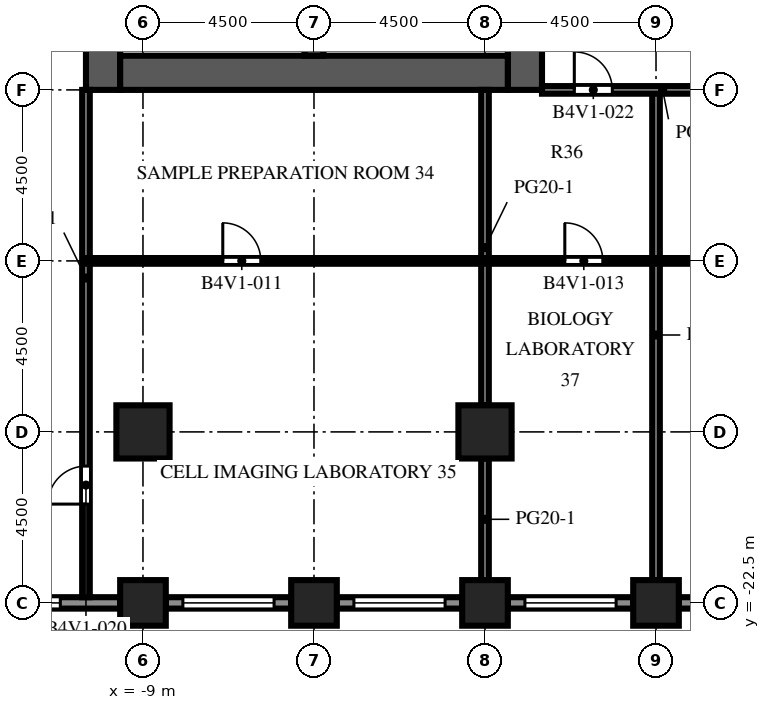
"""IFC4 building model, lengths in metres.
Left out: names, types, materials, properties, quantities, classifications, styles, units other than length and angle.
Written with IfcOpenShell. Run it as: python <this file> out.ifc"""

import sys

from ifc_helpers import new_model, si_unit, direction, frame, frame_2d, origin, origin_2d, place, context, subcontext, project, spatial, rectangle, extrude, element, fill, save


model = new_model("IFC4")
c1 = context("Model", 3, precision=1e-05, world=origin(), true_north=direction((0.0, 1.0)))
c2 = subcontext(c1, "Body", "Model", "MODEL_VIEW")
j1 = project(units=[si_unit("LENGTHUNIT", "METRE"), si_unit("PLANEANGLEUNIT", "RADIAN")], contexts=[c1])
p1 = place(None, origin())
s1 = spatial("IfcSite", under=j1, at=p1, CompositionType="ELEMENT")
p2 = place(p1, origin())
s2 = spatial("IfcBuilding", under=s1, at=p2, CompositionType="ELEMENT")
p3 = place(p2, frame((0.0, 0.0, 124.9)))
s3 = spatial("IfcBuildingStorey", under=s2, at=p3, CompositionType="ELEMENT", Elevation=124.9)
for number, where, z_axis, x_axis in (
    (1, (-9.0, -22.5, 0.0), (0.0, 0.0, 1.0), (1.0, 0.0, 0.0)),
    (2, (-4.5, -22.5, 0.0), (0.0, 0.0, 1.0), (1.0, 0.0, 0.0)),
    (3, (0.0, -22.5, 0.0), (0.0, 0.0, 1.0), (1.0, 0.0, 0.0)),
    (4, (4.5, -22.5, 0.0), (0.0, 0.0, 1.0), (1.0, 0.0, 0.0)),
):
    element("IfcColumn", number, at=place(p3, frame(where, z_axis=z_axis, x_axis=x_axis)), inside=s3, PredefinedType="COLUMN", context=c2, shape_type="SweptSolid", body=[
        extrude(rectangle(XDim=1.2, YDim=1.2, at=origin_2d()), origin(), (0.0, 0.0, 1.0), 4.1),
    ])
for number, where, z_axis, x_axis in (
    (5, (-9.0, -18.0, 0.0), (0.0, 0.0, 1.0), (1.0, 0.0, 0.0)),
    (6, (0.0, -18.0, 0.0), (0.0, 0.0, 1.0), (1.0, 0.0, 0.0)),
):
    element("IfcColumn", number, at=place(p3, frame(where, z_axis=z_axis, x_axis=x_axis)), inside=s3, PredefinedType="COLUMN", context=c2, shape_type="SweptSolid", body=[
        extrude(rectangle(XDim=1.4, YDim=1.4, at=origin_2d()), origin(), (0.0, 0.0, 1.0), 4.1),
    ])
p4 = place(p3, frame((-10.05, -9.0, 0.0), z_axis=(0.0, 0.0, 1.0), x_axis=(0.0, 1.0, 0.0)))
e7 = element("IfcWall", 7, at=p4, inside=s3, PredefinedType="SHEAR", context=c2, shape_type="SweptSolid", body=[
    extrude(rectangle(XDim=27.5, YDim=0.9, at=frame_2d((13.75, 0.0))), origin(), (0.0, 0.0, 1.0), 4.1),
])
p5 = place(p4, frame((12.55, 0.0, 0.0)))
e8 = element("IfcOpeningElement", 8, at=p5, cuts=e7, PredefinedType="OPENING", context=c2, shape_type="SweptSolid", body=[
    extrude(rectangle(XDim=2.4, YDim=2.4, at=frame_2d((1.2, 1.2))), frame((0.0, 0.46, 0.0), z_axis=(0.0, -1.0, 0.0), x_axis=(1.0, 0.0, 0.0)), (0.0, 0.0, 1.0), 0.92),
])
p6 = place(p4, frame((6.825, 0.0, 0.0)))
e9 = element("IfcOpeningElement", 9, at=p6, cuts=e7, PredefinedType="OPENING", context=c2, shape_type="SweptSolid", body=[
    extrude(rectangle(XDim=1.2, YDim=2.1, at=frame_2d((0.6, 1.05))), frame((0.0, 0.46, 0.0), z_axis=(0.0, -1.0, 0.0), x_axis=(1.0, 0.0, 0.0)), (0.0, 0.0, 1.0), 0.92),
])
p7 = place(p4, frame((19.475, 0.0, 0.0)))
e10 = element("IfcOpeningElement", 10, at=p7, cuts=e7, PredefinedType="OPENING", context=c2, shape_type="SweptSolid", body=[
    extrude(rectangle(XDim=1.2, YDim=2.1, at=frame_2d((0.6, 1.05))), frame((0.0, 0.46, 0.0), z_axis=(0.0, -1.0, 0.0), x_axis=(1.0, 0.0, 0.0)), (0.0, 0.0, 1.0), 0.92),
])
p8 = place(p3, frame((1.05, -9.0, 0.0), z_axis=(0.0, 0.0, 1.0), x_axis=(0.0, 1.0, 0.0)))
e11 = element("IfcWall", 11, at=p8, inside=s3, PredefinedType="SHEAR", context=c2, shape_type="SweptSolid", body=[
    extrude(rectangle(XDim=27.5, YDim=0.9, at=frame_2d((13.75, 0.0))), origin(), (0.0, 0.0, 1.0), 4.1),
])
p9 = place(p8, frame((12.55, 0.0, 0.0)))
e12 = element("IfcOpeningElement", 12, at=p9, cuts=e11, PredefinedType="OPENING", context=c2, shape_type="SweptSolid", body=[
    extrude(rectangle(XDim=2.4, YDim=2.4, at=frame_2d((1.2, 1.2))), frame((0.0, 0.46, 0.0), z_axis=(0.0, -1.0, 0.0), x_axis=(1.0, 0.0, 0.0)), (0.0, 0.0, 1.0), 0.92),
])
p10 = place(p8, frame((3.975, 0.0, 0.0)))
e13 = element("IfcOpeningElement", 13, at=p10, cuts=e11, PredefinedType="OPENING", context=c2, shape_type="SweptSolid", body=[
    extrude(rectangle(XDim=1.2, YDim=2.1, at=frame_2d((0.6, 1.05))), frame((0.0, 0.46, 0.0), z_axis=(0.0, -1.0, 0.0), x_axis=(1.0, 0.0, 0.0)), (0.0, 0.0, 1.0), 0.92),
])
p11 = place(p8, frame((22.325, 0.0, 0.0)))
e14 = element("IfcOpeningElement", 14, at=p11, cuts=e11, PredefinedType="OPENING", context=c2, shape_type="SweptSolid", body=[
    extrude(rectangle(XDim=1.2, YDim=2.1, at=frame_2d((0.6, 1.05))), frame((0.0, 0.46, 0.0), z_axis=(0.0, -1.0, 0.0), x_axis=(1.0, 0.0, 0.0)), (0.0, 0.0, 1.0), 0.92),
])
p12 = place(p3, frame((-9.6, -8.55, 0.0), z_axis=(0.0, 0.0, 1.0), x_axis=(1.0, 0.0, 0.0)))
e15 = element("IfcWall", 15, at=p12, inside=s3, PredefinedType="SHEAR", context=c2, shape_type="SweptSolid", body=[
    extrude(rectangle(XDim=10.2, YDim=0.9, at=frame_2d((5.1, 0.0))), origin(), (0.0, 0.0, 1.0), 4.1),
])
p13 = place(p3, frame((-4.5, -8.1, 0.0), z_axis=(0.0, 0.0, 1.0), x_axis=(0.0, 1.0, 0.0)))
e16 = element("IfcWall", 16, at=p13, inside=s3, PredefinedType="SHEAR", context=c2, shape_type="SweptSolid", body=[
    extrude(rectangle(XDim=7.35, YDim=0.5, at=frame_2d((3.675, 0.0))), origin(), (0.0, 0.0, 1.0), 4.1),
])
p14 = place(p3, frame((-9.6, -22.5, 0.0), z_axis=(0.0, 0.0, 1.0), x_axis=(-1.0, 0.0, 0.0)))
e17 = element("IfcWall", 17, at=p14, inside=s3, PredefinedType="SOLIDWALL", context=c2, shape_type="SweptSolid", body=[
    extrude(rectangle(XDim=3.3, YDim=0.3, at=frame_2d((1.65, 0.0))), origin(), (0.0, 0.0, 1.0), 2.75),
])
p15 = place(p14, frame((1.575, 0.0, 0.8)))
e18 = element("IfcOpeningElement", 18, at=p15, cuts=e17, PredefinedType="OPENING", context=c2, shape_type="SweptSolid", body=[
    extrude(rectangle(XDim=1.2, YDim=1.7, at=frame_2d((0.6, 0.85))), frame((0.0, 0.16, 0.0), z_axis=(0.0, -1.0, 0.0), x_axis=(1.0, 0.0, 0.0)), (0.0, 0.0, 1.0), 0.32),
])
p16 = place(p3, frame((-5.1, -22.5, 0.0), z_axis=(0.0, 0.0, 1.0), x_axis=(-1.0, 0.0, 0.0)))
e19 = element("IfcWall", 19, at=p16, inside=s3, PredefinedType="SOLIDWALL", context=c2, shape_type="SweptSolid", body=[
    extrude(rectangle(XDim=3.3, YDim=0.3, at=frame_2d((1.65, 0.0))), origin(), (0.0, 0.0, 1.0), 2.75),
])
p17 = place(p16, frame((0.45, 0.0, 0.8)))
e20 = element("IfcOpeningElement", 20, at=p17, cuts=e19, PredefinedType="OPENING", context=c2, shape_type="SweptSolid", body=[
    extrude(rectangle(XDim=2.4, YDim=1.7, at=frame_2d((1.2, 0.85))), frame((0.0, 0.16, 0.0), z_axis=(0.0, -1.0, 0.0), x_axis=(1.0, 0.0, 0.0)), (0.0, 0.0, 1.0), 0.32),
])
p18 = place(p3, frame((-0.6, -22.5, 0.0), z_axis=(0.0, 0.0, 1.0), x_axis=(-1.0, 0.0, 0.0)))
e21 = element("IfcWall", 21, at=p18, inside=s3, PredefinedType="SOLIDWALL", context=c2, shape_type="SweptSolid", body=[
    extrude(rectangle(XDim=3.3, YDim=0.3, at=frame_2d((1.65, 0.0))), origin(), (0.0, 0.0, 1.0), 2.75),
])
p19 = place(p18, frame((0.45, 0.0, 0.8)))
e22 = element("IfcOpeningElement", 22, at=p19, cuts=e21, PredefinedType="OPENING", context=c2, shape_type="SweptSolid", body=[
    extrude(rectangle(XDim=2.4, YDim=1.7, at=frame_2d((1.2, 0.85))), frame((0.0, 0.16, 0.0), z_axis=(0.0, -1.0, 0.0), x_axis=(1.0, 0.0, 0.0)), (0.0, 0.0, 1.0), 0.32),
])
p20 = place(p3, frame((3.9, -22.5, 0.0), z_axis=(0.0, 0.0, 1.0), x_axis=(-1.0, 0.0, 0.0)))
e23 = element("IfcWall", 23, at=p20, inside=s3, PredefinedType="SOLIDWALL", context=c2, shape_type="SweptSolid", body=[
    extrude(rectangle(XDim=3.3, YDim=0.3, at=frame_2d((1.65, 0.0))), origin(), (0.0, 0.0, 1.0), 2.75),
])
p21 = place(p20, frame((0.45, 0.0, 0.8)))
e24 = element("IfcOpeningElement", 24, at=p21, cuts=e23, PredefinedType="OPENING", context=c2, shape_type="SweptSolid", body=[
    extrude(rectangle(XDim=2.4, YDim=1.7, at=frame_2d((1.2, 0.85))), frame((0.0, 0.16, 0.0), z_axis=(0.0, -1.0, 0.0), x_axis=(1.0, 0.0, 0.0)), (0.0, 0.0, 1.0), 0.32),
])
p22 = place(p3, frame((8.4, -22.5, 0.0), z_axis=(0.0, 0.0, 1.0), x_axis=(-1.0, 0.0, 0.0)))
e25 = element("IfcWall", 25, at=p22, inside=s3, PredefinedType="SOLIDWALL", context=c2, shape_type="SweptSolid", body=[
    extrude(rectangle(XDim=3.3, YDim=0.3, at=frame_2d((1.65, 0.0))), origin(), (0.0, 0.0, 1.0), 2.75),
])
p23 = place(p22, frame((0.45, 0.0, 0.8)))
e26 = element("IfcOpeningElement", 26, at=p23, cuts=e25, PredefinedType="OPENING", context=c2, shape_type="SweptSolid", body=[
    extrude(rectangle(XDim=2.4, YDim=1.7, at=frame_2d((1.2, 0.85))), frame((0.0, 0.16, 0.0), z_axis=(0.0, -1.0, 0.0), x_axis=(1.0, 0.0, 0.0)), (0.0, 0.0, 1.0), 0.32),
])
p24 = place(p3, frame((-0.9, -8.1, 0.0), z_axis=(0.0, 0.0, 1.0), x_axis=(0.0, 1.0, 0.0)))
e27 = element("IfcWall", 27, at=p24, inside=s3, PredefinedType="PARTITIONING", context=c2, shape_type="SweptSolid", body=[
    extrude(rectangle(XDim=2.205, YDim=0.1, at=frame_2d((1.103, 0.0))), origin(), (0.0, 0.0, 1.0), 3.65),
])
p25 = place(p24, frame((0.603, 0.0, 0.0)))
e28 = element("IfcOpeningElement", 28, at=p25, cuts=e27, PredefinedType="OPENING", context=c2, shape_type="SweptSolid", body=[
    extrude(rectangle(XDim=1.0, YDim=2.1, at=frame_2d((0.5, 1.05))), frame((0.0, 0.06, 0.0), z_axis=(0.0, -1.0, 0.0), x_axis=(1.0, 0.0, 0.0)), (0.0, 0.0, 1.0), 0.12),
])
p26 = place(p3, frame((-10.5, -9.0, 0.0), z_axis=(0.0, 0.0, 1.0), x_axis=(0.0, -1.0, 0.0)))
e29 = element("IfcWall", 29, at=p26, inside=s3, PredefinedType="PARTITIONING", context=c2, shape_type="SweptSolid", body=[
    extrude(rectangle(XDim=13.35, YDim=0.2, at=frame_2d((6.675, 0.0))), origin(), (0.0, 0.0, 1.0), 3.65),
])
p27 = place(p26, frame((9.9, 0.0, 0.0)))
e30 = element("IfcOpeningElement", 30, at=p27, cuts=e29, PredefinedType="OPENING", context=c2, shape_type="SweptSolid", body=[
    extrude(rectangle(XDim=1.0, YDim=2.1, at=frame_2d((0.5, 1.05))), frame((0.0, 0.11, 0.0), z_axis=(0.0, -1.0, 0.0), x_axis=(1.0, 0.0, 0.0)), (0.0, 0.0, 1.0), 0.22),
])
p28 = place(p3, frame((0.0, -21.9, 0.0), z_axis=(0.0, 0.0, 1.0), x_axis=(0.0, 1.0, 0.0)))
e31 = element("IfcWall", 31, at=p28, inside=s3, PredefinedType="PARTITIONING", context=c2, shape_type="SweptSolid", body=[
    extrude(rectangle(XDim=3.2, YDim=0.2, at=frame_2d((1.6, 0.0))), origin(), (0.0, 0.0, 1.0), 3.65),
])
p29 = place(p3, frame((0.0, -17.3, 0.0), z_axis=(0.0, 0.0, 1.0), x_axis=(0.0, 1.0, 0.0)))
e32 = element("IfcWall", 32, at=p29, inside=s3, PredefinedType="PARTITIONING", context=c2, shape_type="SweptSolid", body=[
    extrude(rectangle(XDim=8.3, YDim=0.2, at=frame_2d((4.15, 0.0))), origin(), (0.0, 0.0, 1.0), 3.65),
])
p30 = place(p3, frame((4.5, -21.9, 0.0), z_axis=(0.0, 0.0, 1.0), x_axis=(0.0, 1.0, 0.0)))
e33 = element("IfcWall", 33, at=p30, inside=s3, PredefinedType="PARTITIONING", context=c2, shape_type="SweptSolid", body=[
    extrude(rectangle(XDim=12.9, YDim=0.2, at=frame_2d((6.45, 0.0))), origin(), (0.0, 0.0, 1.0), 3.65),
])
p31 = place(p3, frame((-10.5, -13.5, 0.0), z_axis=(0.0, 0.0, 1.0), x_axis=(1.0, 0.0, 0.0)))
e34 = element("IfcWall", 34, at=p31, inside=s3, PredefinedType="PARTITIONING", context=c2, shape_type="SweptSolid", body=[
    extrude(rectangle(XDim=28.5, YDim=0.15, at=frame_2d((14.25, 0.0))), origin(), (0.0, 0.0, 1.0), 3.65),
])
p32 = place(p31, frame((3.6, 0.0, 0.0)))
e35 = element("IfcOpeningElement", 35, at=p32, cuts=e34, PredefinedType="OPENING", context=c2, shape_type="SweptSolid", body=[
    extrude(rectangle(XDim=1.0, YDim=2.1, at=frame_2d((0.5, 1.05))), frame((0.0, 0.085, 0.0), z_axis=(0.0, -1.0, 0.0), x_axis=(1.0, 0.0, 0.0)), (0.0, 0.0, 1.0), 0.17),
])
p33 = place(p31, frame((12.6, 0.0, 0.0)))
e36 = element("IfcOpeningElement", 36, at=p33, cuts=e34, PredefinedType="OPENING", context=c2, shape_type="SweptSolid", body=[
    extrude(rectangle(XDim=1.0, YDim=2.1, at=frame_2d((0.5, 1.05))), frame((0.0, 0.085, 0.0), z_axis=(0.0, -1.0, 0.0), x_axis=(1.0, 0.0, 0.0)), (0.0, 0.0, 1.0), 0.17),
])
p34 = place(p31, frame((19.35, 0.0, 0.0)))
e37 = element("IfcOpeningElement", 37, at=p34, cuts=e34, PredefinedType="OPENING", context=c2, shape_type="SweptSolid", body=[
    extrude(rectangle(XDim=1.0, YDim=2.1, at=frame_2d((0.5, 1.05))), frame((0.0, 0.085, 0.0), z_axis=(0.0, -1.0, 0.0), x_axis=(1.0, 0.0, 0.0)), (0.0, 0.0, 1.0), 0.17),
])
p35 = place(p3, frame((6.0, -9.0, 0.0), z_axis=(0.0, 0.0, 1.0), x_axis=(-1.0, 0.0, 0.0)))
e38 = element("IfcWall", 38, at=p35, inside=s3, PredefinedType="PARTITIONING", context=c2, shape_type="SweptSolid", body=[
    extrude(rectangle(XDim=4.5, YDim=0.2, at=frame_2d((2.25, 0.0))), origin(), (0.0, 0.0, 1.0), 3.65),
])
p36 = place(p35, frame((2.65, 0.0, 0.0)))
e39 = element("IfcOpeningElement", 39, at=p36, cuts=e38, PredefinedType="OPENING", context=c2, shape_type="SweptSolid", body=[
    extrude(rectangle(XDim=1.0, YDim=2.1, at=frame_2d((0.5, 1.05))), frame((0.0, 0.11, 0.0), z_axis=(0.0, -1.0, 0.0), x_axis=(1.0, 0.0, 0.0)), (0.0, 0.0, 1.0), 0.22),
])
p37 = place(p15, origin())
e40 = element("IfcWindow", 40, at=p37, inside=s3, PartitioningType="SINGLE_PANEL", PredefinedType="WINDOW", context=c2, shape_type="SweptSolid", body=[
    extrude(rectangle(XDim=1.2, YDim=1.7, at=frame_2d((0.6, 0.85))), frame((0.0, 0.03, 0.0), z_axis=(0.0, -1.0, 0.0), x_axis=(1.0, 0.0, 0.0)), (0.0, 0.0, 1.0), 0.06),
])
fill(e18, e40)
p38 = place(p17, origin())
e41 = element("IfcWindow", 41, at=p38, inside=s3, PartitioningType="SINGLE_PANEL", PredefinedType="WINDOW", context=c2, shape_type="SweptSolid", body=[
    extrude(rectangle(XDim=2.4, YDim=1.7, at=frame_2d((1.2, 0.85))), frame((0.0, 0.03, 0.0), z_axis=(0.0, -1.0, 0.0), x_axis=(1.0, 0.0, 0.0)), (0.0, 0.0, 1.0), 0.06),
])
fill(e20, e41)
p39 = place(p19, origin())
e42 = element("IfcWindow", 42, at=p39, inside=s3, PartitioningType="SINGLE_PANEL", PredefinedType="WINDOW", context=c2, shape_type="SweptSolid", body=[
    extrude(rectangle(XDim=2.4, YDim=1.7, at=frame_2d((1.2, 0.85))), frame((0.0, 0.03, 0.0), z_axis=(0.0, -1.0, 0.0), x_axis=(1.0, 0.0, 0.0)), (0.0, 0.0, 1.0), 0.06),
])
fill(e22, e42)
p40 = place(p21, origin())
e43 = element("IfcWindow", 43, at=p40, inside=s3, PartitioningType="SINGLE_PANEL", PredefinedType="WINDOW", context=c2, shape_type="SweptSolid", body=[
    extrude(rectangle(XDim=2.4, YDim=1.7, at=frame_2d((1.2, 0.85))), frame((0.0, 0.03, 0.0), z_axis=(0.0, -1.0, 0.0), x_axis=(1.0, 0.0, 0.0)), (0.0, 0.0, 1.0), 0.06),
])
fill(e24, e43)
p41 = place(p32, origin())
e44 = element("IfcDoor", 44, at=p41, inside=s3, OperationType="SINGLE_SWING_LEFT", PredefinedType="DOOR", context=c2, shape_type="SweptSolid", body=[
    extrude(rectangle(XDim=1.0, YDim=2.1, at=frame_2d((0.5, 1.05))), frame((0.0, 0.025, 0.0), z_axis=(0.0, -1.0, 0.0), x_axis=(1.0, 0.0, 0.0)), (0.0, 0.0, 1.0), 0.05),
])
fill(e35, e44)
p42 = place(p33, origin())
e45 = element("IfcDoor", 45, at=p42, inside=s3, OperationType="SINGLE_SWING_LEFT", PredefinedType="DOOR", context=c2, shape_type="SweptSolid", body=[
    extrude(rectangle(XDim=1.0, YDim=2.1, at=frame_2d((0.5, 1.05))), frame((0.0, 0.025, 0.0), z_axis=(0.0, -1.0, 0.0), x_axis=(1.0, 0.0, 0.0)), (0.0, 0.0, 1.0), 0.05),
])
fill(e36, e45)
p43 = place(p27, origin())
e46 = element("IfcDoor", 46, at=p43, inside=s3, OperationType="SINGLE_SWING_RIGHT", PredefinedType="DOOR", context=c2, shape_type="SweptSolid", body=[
    extrude(rectangle(XDim=1.0, YDim=2.1, at=frame_2d((0.5, 1.05))), frame((0.0, 0.025, 0.0), z_axis=(0.0, -1.0, 0.0), x_axis=(1.0, 0.0, 0.0)), (0.0, 0.0, 1.0), 0.05),
])
fill(e30, e46)
p44 = place(p36, origin())
e47 = element("IfcDoor", 47, at=p44, inside=s3, OperationType="SINGLE_SWING_RIGHT", PredefinedType="DOOR", context=c2, shape_type="SweptSolid", body=[
    extrude(rectangle(XDim=1.0, YDim=2.1, at=frame_2d((0.5, 1.05))), frame((0.0, 0.025, 0.0), z_axis=(0.0, -1.0, 0.0), x_axis=(1.0, 0.0, 0.0)), (0.0, 0.0, 1.0), 0.05),
])
fill(e39, e47)
save(model, sys.argv[1])
